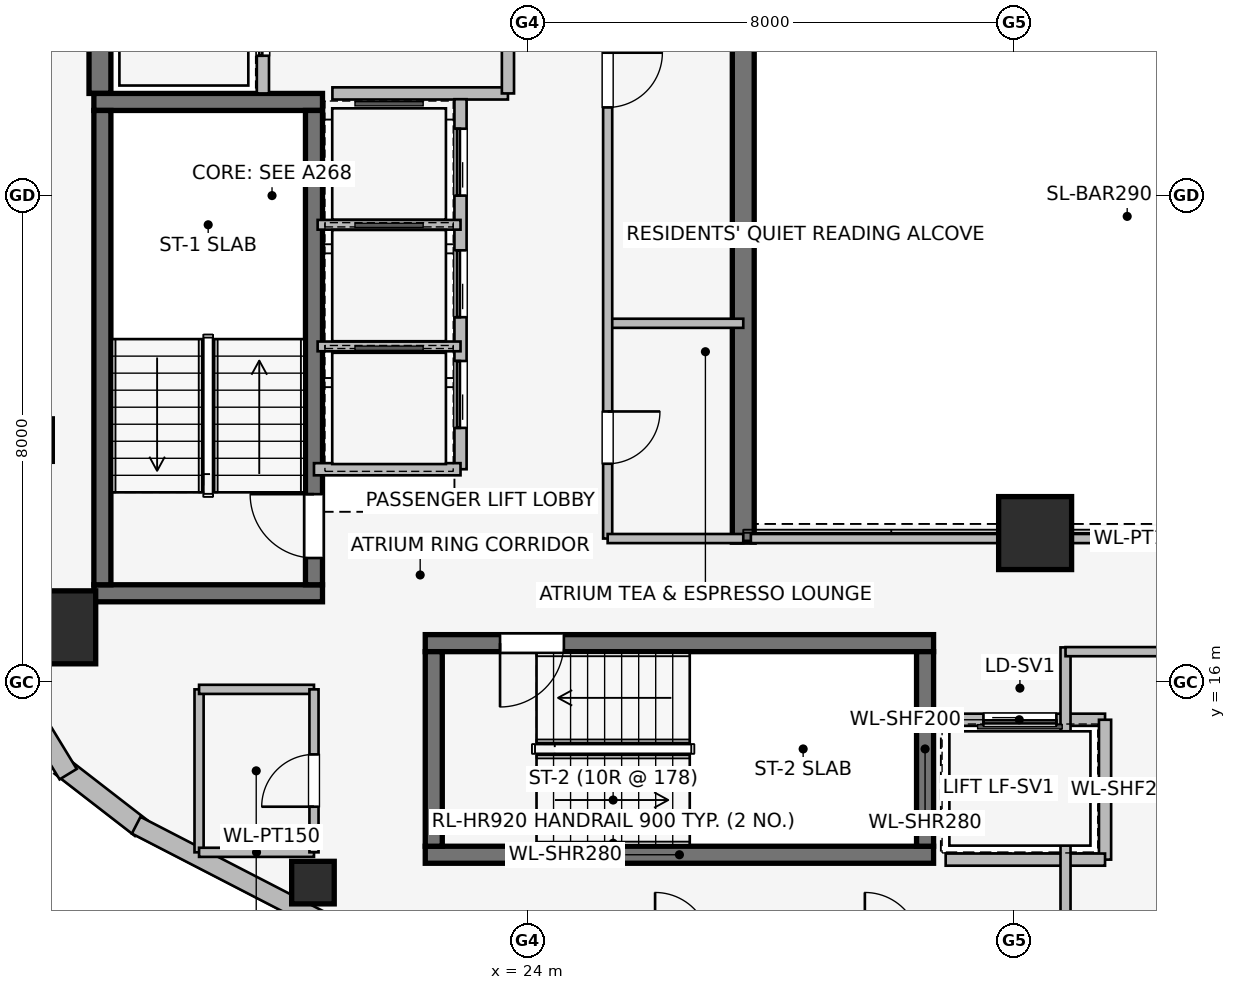
"""IFC4 building model, lengths in metres.
Left out: names, types, materials, properties, quantities, classifications, styles, units other than length and angle.
Written with IfcOpenShell. Run it as: python <this file> out.ifc"""

import sys

from ifc_helpers import new_model, si_unit, direction, frame, frame_2d, origin, origin_2d, place, context, subcontext, project, spatial, rectangle, extrude, element, fill, save


model = new_model("IFC4")
c1 = context("Model", 3, precision=1e-05, world=origin(), true_north=direction((0.0, 1.0)))
c2 = subcontext(c1, "Body", "Model", "MODEL_VIEW")
j1 = project(units=[si_unit("LENGTHUNIT", "METRE"), si_unit("PLANEANGLEUNIT", "RADIAN")], contexts=[c1])
p1 = place(None, origin())
s1 = spatial("IfcSite", under=j1, at=p1, CompositionType="ELEMENT")
p2 = place(p1, origin())
s2 = spatial("IfcBuilding", under=s1, at=p2, CompositionType="ELEMENT")
p3 = place(p2, frame((0.0, 0.0, 241.9)))
s3 = spatial("IfcBuildingStorey", under=s2, at=p3, CompositionType="ELEMENT", Elevation=241.9)
p4 = place(p3, frame((16.97, 25.68, 0.0), z_axis=(0.0, 0.0, 1.0), x_axis=(0.0, 1.0, 0.0)))
e1 = element("IfcWall", 1, at=p4, inside=s3, PredefinedType="SHEAR", context=c2, shape_type="SweptSolid", body=[
    extrude(rectangle(XDim=5.62, YDim=0.36, at=frame_2d((2.81, 0.0))), origin(), (0.0, 0.0, 1.0), 3.55),
])
p5 = place(p3, frame((27.55, 29.55, 0.0), z_axis=(0.0, 0.0, 1.0), x_axis=(0.0, -1.0, 0.0)))
e2 = element("IfcWall", 2, at=p5, inside=s3, PredefinedType="SHEAR", context=c2, shape_type="SweptSolid", body=[
    extrude(rectangle(XDim=11.25, YDim=0.36, at=frame_2d((5.625, 0.0))), origin(), (0.0, 0.0, 1.0), 3.55),
])
for number, where, z_axis, x_axis in (
    (3, (16.87, 17.46, 0.0), (0.0, 0.0, 1.0), (1.0, 0.0, 0.0)),
    (4, (20.63, 25.54, 0.0), (0.0, 0.0, 1.0), (-1.0, 0.0, 0.0)),
):
    element("IfcWall", number, at=place(p3, frame(where, z_axis=z_axis, x_axis=x_axis)), inside=s3, PredefinedType="SHEAR", context=c2, shape_type="SweptSolid", body=[
        extrude(rectangle(XDim=3.76, YDim=0.28, at=frame_2d((1.88, 0.0))), origin(), (0.0, 0.0, 1.0), 3.55),
    ])
p6 = place(p3, frame((17.01, 25.4, 0.0), z_axis=(0.0, 0.0, 1.0), x_axis=(0.0, -1.0, 0.0)))
e5 = element("IfcWall", 5, at=p6, inside=s3, PredefinedType="SHEAR", context=c2, shape_type="SweptSolid", body=[
    extrude(rectangle(XDim=7.8, YDim=0.28, at=frame_2d((3.9, 0.0))), origin(), (0.0, 0.0, 1.0), 3.55),
])
p7 = place(p3, frame((20.49, 17.6, 0.0), z_axis=(0.0, 0.0, 1.0), x_axis=(0.0, 1.0, 0.0)))
e6 = element("IfcWall", 6, at=p7, inside=s3, PredefinedType="SHEAR", context=c2, shape_type="SweptSolid", body=[
    extrude(rectangle(XDim=7.8, YDim=0.28, at=frame_2d((3.9, 0.0))), origin(), (0.0, 0.0, 1.0), 3.55),
])
p8 = place(p7, frame((0.44, 0.0, 0.0)))
e7 = element("IfcOpeningElement", 7, at=p8, cuts=e6, PredefinedType="OPENING", context=c2, shape_type="SweptSolid", body=[
    extrude(rectangle(XDim=1.05, YDim=2.0, at=frame_2d((0.525, 1.0))), frame((0.0, 0.15, 0.0), z_axis=(0.0, -1.0, 0.0), x_axis=(1.0, 0.0, 0.0)), (0.0, 0.0, 1.0), 0.3),
])
p9 = place(p3, frame((22.32, 13.16, 0.0), z_axis=(0.0, 0.0, 1.0), x_axis=(1.0, 0.0, 0.0)))
e8 = element("IfcWall", 8, at=p9, inside=s3, PredefinedType="SHEAR", context=c2, shape_type="SweptSolid", body=[
    extrude(rectangle(XDim=8.36, YDim=0.28, at=frame_2d((4.18, 0.0))), origin(), (0.0, 0.0, 1.0), 3.55),
])
p10 = place(p3, frame((30.68, 16.64, 0.0), z_axis=(0.0, 0.0, 1.0), x_axis=(-1.0, 0.0, 0.0)))
e9 = element("IfcWall", 9, at=p10, inside=s3, PredefinedType="SHEAR", context=c2, shape_type="SweptSolid", body=[
    extrude(rectangle(XDim=8.36, YDim=0.28, at=frame_2d((4.18, 0.0))), origin(), (0.0, 0.0, 1.0), 3.55),
])
p11 = place(p10, frame((6.08, 0.0, 0.0)))
e10 = element("IfcOpeningElement", 10, at=p11, cuts=e9, PredefinedType="OPENING", context=c2, shape_type="SweptSolid", body=[
    extrude(rectangle(XDim=1.05, YDim=2.0, at=frame_2d((0.525, 1.0))), frame((0.0, 0.15, 0.0), z_axis=(0.0, -1.0, 0.0), x_axis=(1.0, 0.0, 0.0)), (0.0, 0.0, 1.0), 0.3),
])
for number, where, z_axis, x_axis in (
    (11, (22.46, 16.5, 0.0), (0.0, 0.0, 1.0), (0.0, -1.0, 0.0)),
    (12, (30.54, 13.3, 0.0), (0.0, 0.0, 1.0), (0.0, 1.0, 0.0)),
):
    element("IfcWall", number, at=place(p3, frame(where, z_axis=z_axis, x_axis=x_axis)), inside=s3, PredefinedType="SHEAR", context=c2, shape_type="SweptSolid", body=[
        extrude(rectangle(XDim=3.2, YDim=0.28, at=frame_2d((1.6, 0.0))), origin(), (0.0, 0.0, 1.0), 3.55),
    ])
for number, where, z_axis, x_axis in (
    (13, (16.3, 16.9, 0.0), (0.0, 0.0, 1.0), (1.0, 0.0, 0.0)),
    (14, (32.35, 18.45, 0.0), (0.0, 0.0, 1.0), (1.0, 0.0, 0.0)),
):
    element("IfcColumn", number, at=place(p3, frame(where, z_axis=z_axis, x_axis=x_axis)), inside=s3, PredefinedType="COLUMN", context=c2, shape_type="SweptSolid", body=[
        extrude(rectangle(XDim=1.2, YDim=1.2, at=origin_2d()), origin(), (0.0, 0.0, 1.0), 3.55),
    ])
p12 = place(p3, frame((20.473, 12.702, 0.0), z_axis=(0.0, 0.0, 1.0), x_axis=(1.0, 0.0, 0.0)))
e15 = element("IfcColumn", 15, at=p12, inside=s3, PredefinedType="COLUMN", context=c2, shape_type="SweptSolid", body=[
    extrude(rectangle(XDim=0.7, YDim=0.7, at=origin_2d()), origin(), (0.0, 0.0, 1.0), 3.55),
])
p13 = place(p3, frame((17.647, 13.599, 0.0), z_axis=(0.0, 0.0, 1.0), x_axis=(-0.790691856293, 0.61221433207, 0.0)))
e16 = element("IfcWall", 16, at=p13, inside=s3, PredefinedType="STANDARD", context=c2, shape_type="SweptSolid", body=[
    extrude(rectangle(XDim=1.676, YDim=0.33, at=frame_2d((0.838, 0.0))), origin(), (0.0, 0.0, 1.0), 3.29),
])
p14 = place(p3, frame((16.447, 14.485, 0.0), z_axis=(0.0, 0.0, 1.0), x_axis=(-0.520325409202, 0.853968072318, 0.0)))
e17 = element("IfcWall", 17, at=p14, inside=s3, PredefinedType="STANDARD", context=c2, shape_type="SweptSolid", body=[
    extrude(rectangle(XDim=1.678, YDim=0.33, at=frame_2d((0.839, 0.0))), origin(), (0.0, 0.0, 1.0), 3.29),
])
p15 = place(p3, frame((30.963, 6.73, 0.0), z_axis=(0.0, 0.0, 1.0), x_axis=(-0.888581481622, 0.458718814218, 0.0)))
e18 = element("IfcWall", 18, at=p15, inside=s3, PredefinedType="STANDARD", context=c2, shape_type="SweptSolid", body=[
    extrude(rectangle(XDim=15.077, YDim=0.31, at=frame_2d((7.539, 0.0))), origin(), (0.0, 0.0, 1.0), 3.29),
])
p16 = place(p15, frame((0.998, 0.0, 0.75)))
e19 = element("IfcOpeningElement", 19, at=p16, cuts=e18, PredefinedType="OPENING", context=c2, shape_type="SweptSolid", body=[
    extrude(rectangle(XDim=1.05, YDim=1.4, at=frame_2d((0.525, 0.7))), frame((0.0, 0.165, 0.0), z_axis=(0.0, -1.0, 0.0), x_axis=(1.0, 0.0, 0.0)), (0.0, 0.0, 1.0), 0.33),
])
p17 = place(p15, frame((4.176, 0.0, 0.75)))
e20 = element("IfcOpeningElement", 20, at=p17, cuts=e18, PredefinedType="OPENING", context=c2, shape_type="SweptSolid", body=[
    extrude(rectangle(XDim=1.05, YDim=1.4, at=frame_2d((0.525, 0.7))), frame((0.0, 0.165, 0.0), z_axis=(0.0, -1.0, 0.0), x_axis=(1.0, 0.0, 0.0)), (0.0, 0.0, 1.0), 0.33),
])
p18 = place(p15, frame((6.509, 0.0, 0.75)))
e21 = element("IfcOpeningElement", 21, at=p18, cuts=e18, PredefinedType="OPENING", context=c2, shape_type="SweptSolid", body=[
    extrude(rectangle(XDim=1.05, YDim=1.4, at=frame_2d((0.525, 0.7))), frame((0.0, 0.165, 0.0), z_axis=(0.0, -1.0, 0.0), x_axis=(1.0, 0.0, 0.0)), (0.0, 0.0, 1.0), 0.33),
])
p19 = place(p15, frame((8.842, 0.0, 0.75)))
e22 = element("IfcOpeningElement", 22, at=p19, cuts=e18, PredefinedType="OPENING", context=c2, shape_type="SweptSolid", body=[
    extrude(rectangle(XDim=1.05, YDim=1.4, at=frame_2d((0.525, 0.7))), frame((0.0, 0.165, 0.0), z_axis=(0.0, -1.0, 0.0), x_axis=(1.0, 0.0, 0.0)), (0.0, 0.0, 1.0), 0.33),
])
p20 = place(p3, frame((19.65, 25.68, 0.0), z_axis=(0.0, 0.0, 1.0), x_axis=(0.0, 1.0, 0.0)))
e23 = element("IfcWall", 23, at=p20, inside=s3, PredefinedType="PARTITIONING", context=c2, shape_type="SweptSolid", body=[
    extrude(rectangle(XDim=5.54, YDim=0.2, at=frame_2d((2.77, 0.0))), origin(), (0.0, 0.0, 1.0), 3.29),
])
p21 = place(p20, frame((0.62, 0.0, 0.0)))
e24 = element("IfcOpeningElement", 24, at=p21, cuts=e23, PredefinedType="OPENING", context=c2, shape_type="SweptSolid", body=[
    extrude(rectangle(XDim=1.1, YDim=2.2, at=frame_2d((0.55, 1.1))), frame((0.0, 0.11, 0.0), z_axis=(0.0, -1.0, 0.0), x_axis=(1.0, 0.0, 0.0)), (0.0, 0.0, 1.0), 0.22),
])
p22 = place(p20, frame((3.12, 0.0, 0.0)))
e25 = element("IfcOpeningElement", 25, at=p22, cuts=e23, PredefinedType="OPENING", context=c2, shape_type="SweptSolid", body=[
    extrude(rectangle(XDim=1.1, YDim=2.2, at=frame_2d((0.55, 1.1))), frame((0.0, 0.11, 0.0), z_axis=(0.0, -1.0, 0.0), x_axis=(1.0, 0.0, 0.0)), (0.0, 0.0, 1.0), 0.22),
])
p23 = place(p3, frame((20.793, 25.68, 0.0), z_axis=(0.0, 0.0, 1.0), x_axis=(1.0, 0.0, 0.0)))
e26 = element("IfcWall", 26, at=p23, inside=s3, PredefinedType="PARTITIONING", context=c2, shape_type="SweptSolid", body=[
    extrude(rectangle(XDim=2.887, YDim=0.2, at=frame_2d((1.443, 0.0))), origin(), (0.0, 0.0, 1.0), 3.29),
])
p24 = place(p3, frame((23.68, 25.68, 0.0), z_axis=(0.0, 0.0, 1.0), x_axis=(0.0, 1.0, 0.0)))
e27 = element("IfcWall", 27, at=p24, inside=s3, PredefinedType="PARTITIONING", context=c2, shape_type="SweptSolid", body=[
    extrude(rectangle(XDim=5.54, YDim=0.2, at=frame_2d((2.77, 0.0))), origin(), (0.0, 0.0, 1.0), 3.29),
])
p25 = place(p24, frame((1.8, 0.0, 0.0)))
e28 = element("IfcOpeningElement", 28, at=p25, cuts=e27, PredefinedType="OPENING", context=c2, shape_type="SweptSolid", body=[
    extrude(rectangle(XDim=1.05, YDim=2.0, at=frame_2d((0.525, 1.0))), frame((0.0, 0.11, 0.0), z_axis=(0.0, -1.0, 0.0), x_axis=(1.0, 0.0, 0.0)), (0.0, 0.0, 1.0), 0.22),
])
p26 = place(p3, frame((33.5, 15.38, 0.0), z_axis=(0.0, 0.0, 1.0), x_axis=(-1.0, 0.0, 0.0)))
e29 = element("IfcWall", 29, at=p26, inside=s3, PredefinedType="PARTITIONING", context=c2, shape_type="SweptSolid", body=[
    extrude(rectangle(XDim=2.82, YDim=0.2, at=frame_2d((1.41, 0.0))), origin(), (0.0, 0.0, 1.0), 3.29),
])
p27 = place(p26, frame((0.8, 0.0, 0.0)))
e30 = element("IfcOpeningElement", 30, at=p27, cuts=e29, PredefinedType="OPENING", context=c2, shape_type="SweptSolid", body=[
    extrude(rectangle(XDim=1.2, YDim=2.2, at=frame_2d((0.6, 1.1))), frame((0.0, 0.11, 0.0), z_axis=(0.0, -1.0, 0.0), x_axis=(1.0, 0.0, 0.0)), (0.0, 0.0, 1.0), 0.22),
])
p28 = place(p3, frame((33.5, 13.08, 0.0), z_axis=(0.0, 0.0, 1.0), x_axis=(0.0, 1.0, 0.0)))
e31 = element("IfcWall", 31, at=p28, inside=s3, PredefinedType="PARTITIONING", context=c2, shape_type="SweptSolid", body=[
    extrude(rectangle(XDim=2.3, YDim=0.2, at=frame_2d((1.15, 0.0))), origin(), (0.0, 0.0, 1.0), 3.29),
])
p29 = place(p3, frame((30.879, 13.08, 0.0), z_axis=(0.0, 0.0, 1.0), x_axis=(1.0, 0.0, 0.0)))
e32 = element("IfcWall", 32, at=p29, inside=s3, PredefinedType="PARTITIONING", context=c2, shape_type="SweptSolid", body=[
    extrude(rectangle(XDim=2.621, YDim=0.2, at=frame_2d((1.311, 0.0))), origin(), (0.0, 0.0, 1.0), 3.29),
])
p30 = place(p3, frame((22.9, 19.5, 0.0), z_axis=(0.0, 0.0, 1.0), x_axis=(0.0, 1.0, 0.0)))
e33 = element("IfcWall", 33, at=p30, inside=s3, PredefinedType="PARTITIONING", context=c2, shape_type="SweptSolid", body=[
    extrude(rectangle(XDim=6.085, YDim=0.2, at=frame_2d((3.042, 0.0))), origin(), (0.0, 0.0, 1.0), 3.29),
])
p31 = place(p30, frame((0.68, 0.0, 0.0)))
e34 = element("IfcOpeningElement", 34, at=p31, cuts=e33, PredefinedType="OPENING", context=c2, shape_type="SweptSolid", body=[
    extrude(rectangle(XDim=1.1, YDim=2.2, at=frame_2d((0.55, 1.1))), frame((0.0, 0.11, 0.0), z_axis=(0.0, -1.0, 0.0), x_axis=(1.0, 0.0, 0.0)), (0.0, 0.0, 1.0), 0.22),
])
p32 = place(p30, frame((2.5, 0.0, 0.0)))
e35 = element("IfcOpeningElement", 35, at=p32, cuts=e33, PredefinedType="OPENING", context=c2, shape_type="SweptSolid", body=[
    extrude(rectangle(XDim=1.1, YDim=2.2, at=frame_2d((0.55, 1.1))), frame((0.0, 0.11, 0.0), z_axis=(0.0, -1.0, 0.0), x_axis=(1.0, 0.0, 0.0)), (0.0, 0.0, 1.0), 0.22),
])
p33 = place(p30, frame((4.5, 0.0, 0.0)))
e36 = element("IfcOpeningElement", 36, at=p33, cuts=e33, PredefinedType="OPENING", context=c2, shape_type="SweptSolid", body=[
    extrude(rectangle(XDim=1.1, YDim=2.2, at=frame_2d((0.55, 1.1))), frame((0.0, 0.11, 0.0), z_axis=(0.0, -1.0, 0.0), x_axis=(1.0, 0.0, 0.0)), (0.0, 0.0, 1.0), 0.22),
])
p34 = place(p3, frame((20.49, 19.5, 0.0), z_axis=(0.0, 0.0, 1.0), x_axis=(1.0, 0.0, 0.0)))
e37 = element("IfcWall", 37, at=p34, inside=s3, PredefinedType="PARTITIONING", context=c2, shape_type="SweptSolid", body=[
    extrude(rectangle(XDim=2.41, YDim=0.2, at=frame_2d((1.205, 0.0))), origin(), (0.0, 0.0, 1.0), 2.19),
])
for number, where, z_axis, x_axis in (
    (38, (20.55, 21.52, 0.0), (0.0, 0.0, 1.0), (1.0, 0.0, 0.0)),
    (39, (20.55, 23.52, 0.0), (0.0, 0.0, 1.0), (1.0, 0.0, 0.0)),
):
    element("IfcWall", number, at=place(p3, frame(where, z_axis=z_axis, x_axis=x_axis)), inside=s3, PredefinedType="PARTITIONING", context=c2, shape_type="SweptSolid", body=[
        extrude(rectangle(XDim=2.35, YDim=0.16, at=frame_2d((1.175, 0.0))), origin(), (0.0, 0.0, 1.0), 3.29),
    ])
p35 = place(p3, frame((25.32, 21.9, 0.0), z_axis=(0.0, 0.0, 1.0), x_axis=(1.0, 0.0, 0.0)))
e40 = element("IfcWall", 40, at=p35, inside=s3, PredefinedType="PARTITIONING", context=c2, shape_type="SweptSolid", body=[
    extrude(rectangle(XDim=2.23, YDim=0.15, at=frame_2d((1.115, 0.0))), origin(), (0.0, 0.0, 1.0), 3.29),
])
p36 = place(p3, frame((25.32, 29.55, 0.0), z_axis=(0.0, 0.0, 1.0), x_axis=(0.0, -1.0, 0.0)))
e41 = element("IfcWall", 41, at=p36, inside=s3, PredefinedType="PARTITIONING", context=c2, shape_type="SweptSolid", body=[
    extrude(rectangle(XDim=11.19, YDim=0.15, at=frame_2d((5.595, 0.0))), origin(), (0.0, 0.0, 1.0), 3.29),
])
p37 = place(p36, frame((3.2, 0.0, 0.0)))
e42 = element("IfcOpeningElement", 42, at=p37, cuts=e41, PredefinedType="OPENING", context=c2, shape_type="SweptSolid", body=[
    extrude(rectangle(XDim=0.9, YDim=2.0, at=frame_2d((0.45, 1.0))), frame((0.0, 0.085, 0.0), z_axis=(0.0, -1.0, 0.0), x_axis=(1.0, 0.0, 0.0)), (0.0, 0.0, 1.0), 0.17),
])
p38 = place(p36, frame((9.1, 0.0, 0.0)))
e43 = element("IfcOpeningElement", 43, at=p38, cuts=e41, PredefinedType="OPENING", context=c2, shape_type="SweptSolid", body=[
    extrude(rectangle(XDim=0.86, YDim=2.0, at=frame_2d((0.43, 1.0))), frame((0.0, 0.085, 0.0), z_axis=(0.0, -1.0, 0.0), x_axis=(1.0, 0.0, 0.0)), (0.0, 0.0, 1.0), 0.17),
])
p39 = place(p3, frame((25.32, 18.36, 0.0), z_axis=(0.0, 0.0, 1.0), x_axis=(1.0, 0.0, 0.0)))
e44 = element("IfcWall", 44, at=p39, inside=s3, PredefinedType="PARTITIONING", context=c2, shape_type="SweptSolid", body=[
    extrude(rectangle(XDim=2.23, YDim=0.15, at=frame_2d((1.115, 0.0))), origin(), (0.0, 0.0, 1.0), 3.29),
])
p40 = place(p3, frame((18.6, 15.88, 0.0), z_axis=(0.0, 0.0, 1.0), x_axis=(0.0, -1.0, 0.0)))
e45 = element("IfcWall", 45, at=p40, inside=s3, PredefinedType="PARTITIONING", context=c2, shape_type="SweptSolid", body=[
    extrude(rectangle(XDim=2.68, YDim=0.15, at=frame_2d((1.34, 0.0))), origin(), (0.0, 0.0, 1.0), 3.29),
])
for number, where, z_axis, x_axis in (
    (46, (18.6, 13.2, 0.0), (0.0, 0.0, 1.0), (1.0, 0.0, 0.0)),
    (47, (18.6, 15.88, 0.0), (0.0, 0.0, 1.0), (1.0, 0.0, 0.0)),
):
    element("IfcWall", number, at=place(p3, frame(where, z_axis=z_axis, x_axis=x_axis)), inside=s3, PredefinedType="PARTITIONING", context=c2, shape_type="SweptSolid", body=[
        extrude(rectangle(XDim=1.89, YDim=0.15, at=frame_2d((0.945, 0.0))), origin(), (0.0, 0.0, 1.0), 3.29),
    ])
p41 = place(p3, frame((20.49, 13.2, 0.0), z_axis=(0.0, 0.0, 1.0), x_axis=(0.0, 1.0, 0.0)))
e48 = element("IfcWall", 48, at=p41, inside=s3, PredefinedType="PARTITIONING", context=c2, shape_type="SweptSolid", body=[
    extrude(rectangle(XDim=2.68, YDim=0.15, at=frame_2d((1.34, 0.0))), origin(), (0.0, 0.0, 1.0), 3.29),
])
p42 = place(p41, frame((0.75, 0.0, 0.0)))
e49 = element("IfcOpeningElement", 49, at=p42, cuts=e48, PredefinedType="OPENING", context=c2, shape_type="SweptSolid", body=[
    extrude(rectangle(XDim=0.86, YDim=2.0, at=frame_2d((0.43, 1.0))), frame((0.0, 0.085, 0.0), z_axis=(0.0, -1.0, 0.0), x_axis=(1.0, 0.0, 0.0)), (0.0, 0.0, 1.0), 0.17),
])
p43 = place(p3, frame((27.675, 18.36, 0.0), z_axis=(0.0, 0.0, 1.0), x_axis=(1.0, 0.0, 0.0)))
e50 = element("IfcWall", 50, at=p43, inside=s3, PredefinedType="PARTITIONING", context=c2, shape_type="SweptSolid", body=[
    extrude(rectangle(XDim=12.165, YDim=0.15, at=frame_2d((6.083, 0.0))), origin(), (0.0, 0.0, 1.0), 2.431),
])
p44 = place(p3, frame((32.85, 6.154, 0.0), z_axis=(0.0, 0.0, 1.0), x_axis=(0.0, 1.0, 0.0)))
e51 = element("IfcWall", 51, at=p44, inside=s3, PredefinedType="PARTITIONING", context=c2, shape_type="SweptSolid", body=[
    extrude(rectangle(XDim=10.416, YDim=0.165, at=frame_2d((5.208, 0.0))), origin(), (0.0, 0.0, 1.0), 3.29),
])
p45 = place(p3, frame((32.85, 16.5, 0.0), z_axis=(0.0, 0.0, 1.0), x_axis=(1.0, 0.0, 0.0)))
e52 = element("IfcWall", 52, at=p45, inside=s3, PredefinedType="PARTITIONING", context=c2, shape_type="SweptSolid", body=[
    extrude(rectangle(XDim=5.061, YDim=0.15, at=frame_2d((2.53, 0.0))), origin(), (0.0, 0.0, 1.0), 3.29),
])
p46 = place(p45, frame((2.051, 0.0, 0.0)))
e53 = element("IfcOpeningElement", 53, at=p46, cuts=e52, PredefinedType="OPENING", context=c2, shape_type="SweptSolid", body=[
    extrude(rectangle(XDim=0.96, YDim=2.0, at=frame_2d((0.48, 1.0))), frame((0.0, 0.085, 0.0), z_axis=(0.0, -1.0, 0.0), x_axis=(1.0, 0.0, 0.0)), (0.0, 0.0, 1.0), 0.17),
])
p47 = place(p8, origin())
e54 = element("IfcDoor", 54, at=p47, inside=s3, OperationType="SINGLE_SWING_RIGHT", PredefinedType="DOOR", context=c2, shape_type="SweptSolid", body=[
    extrude(rectangle(XDim=1.05, YDim=2.0, at=frame_2d((0.525, 1.0))), frame((0.0, 0.025, 0.0), z_axis=(0.0, -1.0, 0.0), x_axis=(1.0, 0.0, 0.0)), (0.0, 0.0, 1.0), 0.05),
])
fill(e7, e54)
p48 = place(p11, origin())
e55 = element("IfcDoor", 55, at=p48, inside=s3, OperationType="SINGLE_SWING_RIGHT", PredefinedType="DOOR", context=c2, shape_type="SweptSolid", body=[
    extrude(rectangle(XDim=1.05, YDim=2.0, at=frame_2d((0.525, 1.0))), frame((0.0, 0.025, 0.0), z_axis=(0.0, -1.0, 0.0), x_axis=(1.0, 0.0, 0.0)), (0.0, 0.0, 1.0), 0.05),
])
fill(e10, e55)
p49 = place(p21, origin())
e56 = element("IfcDoor", 56, at=p49, inside=s3, OperationType="SLIDING_TO_LEFT", PredefinedType="DOOR", context=c2, shape_type="SweptSolid", body=[
    extrude(rectangle(XDim=1.1, YDim=2.2, at=frame_2d((0.55, 1.1))), frame((0.0, 0.025, 0.0), z_axis=(0.0, -1.0, 0.0), x_axis=(1.0, 0.0, 0.0)), (0.0, 0.0, 1.0), 0.05),
])
fill(e24, e56)
p50 = place(p27, origin())
e57 = element("IfcDoor", 57, at=p50, inside=s3, OperationType="SLIDING_TO_RIGHT", PredefinedType="DOOR", context=c2, shape_type="SweptSolid", body=[
    extrude(rectangle(XDim=1.2, YDim=2.2, at=frame_2d((0.6, 1.1))), frame((0.0, 0.025, 0.0), z_axis=(0.0, -1.0, 0.0), x_axis=(1.0, 0.0, 0.0)), (0.0, 0.0, 1.0), 0.05),
])
fill(e30, e57)
p51 = place(p31, origin())
e58 = element("IfcDoor", 58, at=p51, inside=s3, OperationType="SLIDING_TO_LEFT", PredefinedType="DOOR", context=c2, shape_type="SweptSolid", body=[
    extrude(rectangle(XDim=1.1, YDim=2.2, at=frame_2d((0.55, 1.1))), frame((0.0, 0.025, 0.0), z_axis=(0.0, -1.0, 0.0), x_axis=(1.0, 0.0, 0.0)), (0.0, 0.0, 1.0), 0.05),
])
fill(e34, e58)
p52 = place(p32, origin())
e59 = element("IfcDoor", 59, at=p52, inside=s3, OperationType="SLIDING_TO_LEFT", PredefinedType="DOOR", context=c2, shape_type="SweptSolid", body=[
    extrude(rectangle(XDim=1.1, YDim=2.2, at=frame_2d((0.55, 1.1))), frame((0.0, 0.025, 0.0), z_axis=(0.0, -1.0, 0.0), x_axis=(1.0, 0.0, 0.0)), (0.0, 0.0, 1.0), 0.05),
])
fill(e35, e59)
p53 = place(p33, origin())
e60 = element("IfcDoor", 60, at=p53, inside=s3, OperationType="SLIDING_TO_LEFT", PredefinedType="DOOR", context=c2, shape_type="SweptSolid", body=[
    extrude(rectangle(XDim=1.1, YDim=2.2, at=frame_2d((0.55, 1.1))), frame((0.0, 0.025, 0.0), z_axis=(0.0, -1.0, 0.0), x_axis=(1.0, 0.0, 0.0)), (0.0, 0.0, 1.0), 0.05),
])
fill(e36, e60)
p54 = place(p37, origin())
e61 = element("IfcDoor", 61, at=p54, inside=s3, OperationType="SINGLE_SWING_LEFT", PredefinedType="DOOR", context=c2, shape_type="SweptSolid", body=[
    extrude(rectangle(XDim=0.9, YDim=2.0, at=frame_2d((0.45, 1.0))), frame((0.0, 0.025, 0.0), z_axis=(0.0, -1.0, 0.0), x_axis=(1.0, 0.0, 0.0)), (0.0, 0.0, 1.0), 0.05),
])
fill(e42, e61)
p55 = place(p38, origin())
e62 = element("IfcDoor", 62, at=p55, inside=s3, OperationType="SINGLE_SWING_LEFT", PredefinedType="DOOR", context=c2, shape_type="SweptSolid", body=[
    extrude(rectangle(XDim=0.86, YDim=2.0, at=frame_2d((0.43, 1.0))), frame((0.0, 0.025, 0.0), z_axis=(0.0, -1.0, 0.0), x_axis=(1.0, 0.0, 0.0)), (0.0, 0.0, 1.0), 0.05),
])
fill(e43, e62)
p56 = place(p42, origin())
e63 = element("IfcDoor", 63, at=p56, inside=s3, OperationType="SINGLE_SWING_LEFT", PredefinedType="DOOR", context=c2, shape_type="SweptSolid", body=[
    extrude(rectangle(XDim=0.86, YDim=2.0, at=frame_2d((0.43, 1.0))), frame((0.0, 0.025, 0.0), z_axis=(0.0, -1.0, 0.0), x_axis=(1.0, 0.0, 0.0)), (0.0, 0.0, 1.0), 0.05),
])
fill(e49, e63)
save(model, sys.argv[1])
